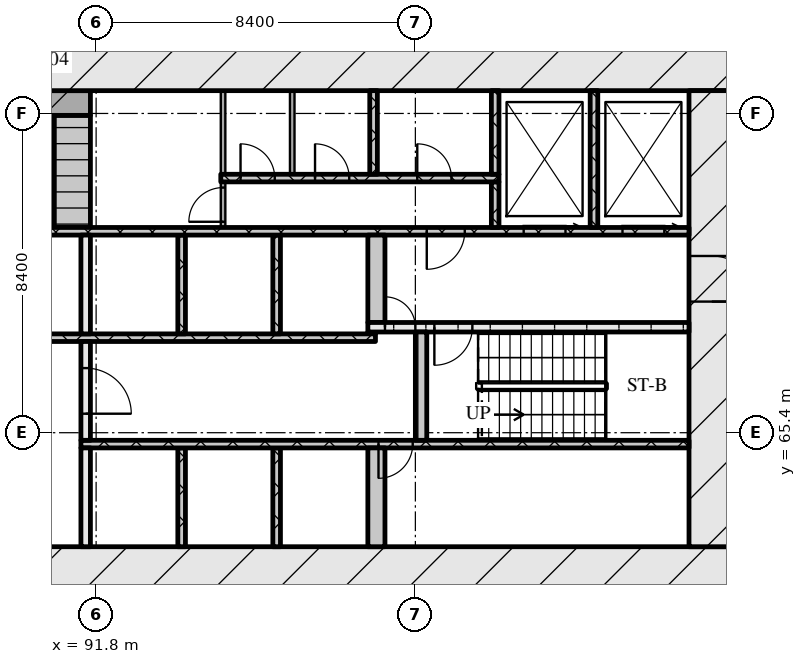
"""IFC4 building model, lengths in metres.
Left out: names, types, materials, properties, quantities, classifications, styles, units other than length and angle.
Written with IfcOpenShell. Run it as: python <this file> out.ifc"""

import sys

from ifc_helpers import new_model, si_unit, direction, frame, frame_2d, origin, place, context, subcontext, project, spatial, rectangle, extrude, element, fill, save


model = new_model("IFC4")
c1 = context("Model", 3, precision=1e-05, world=origin(), true_north=direction((0.0, 1.0)))
c2 = subcontext(c1, "Body", "Model", "MODEL_VIEW")
j1 = project(units=[si_unit("LENGTHUNIT", "METRE"), si_unit("PLANEANGLEUNIT", "RADIAN")], contexts=[c1])
p1 = place(None, origin())
s1 = spatial("IfcSite", under=j1, at=p1, CompositionType="ELEMENT")
p2 = place(p1, origin())
s2 = spatial("IfcBuilding", under=s1, at=p2, CompositionType="ELEMENT")
p3 = place(p2, frame((0.0, 0.0, 14.4)))
s3 = spatial("IfcBuildingStorey", under=s2, at=p3, CompositionType="ELEMENT", Elevation=14.4)
p4 = place(p3, frame((66.6, 61.8, 0.0), z_axis=(0.0, 0.0, 1.0), x_axis=(1.0, 0.0, 0.0)))
e1 = element("IfcWall", 1, at=p4, inside=s3, PredefinedType="SOLIDWALL", context=c2, shape_type="SweptSolid", body=[
    extrude(rectangle(XDim=42.0, YDim=1.2, at=frame_2d((21.0, 0.0))), origin(), (0.0, 0.0, 1.0), 4.5),
])
p5 = place(p4, frame((21.35, 0.0, 0.0)))
e2 = element("IfcOpeningElement", 2, at=p5, cuts=e1, PredefinedType="OPENING", context=c2, shape_type="SweptSolid", body=[
    extrude(rectangle(XDim=1.8, YDim=2.1, at=frame_2d((0.9, 1.05))), frame((0.0, 0.61, 0.0), z_axis=(0.0, -1.0, 0.0), x_axis=(1.0, 0.0, 0.0)), (0.0, 0.0, 1.0), 1.22),
])
p6 = place(p3, frame((66.6, 75.0, 0.0), z_axis=(0.0, 0.0, 1.0), x_axis=(1.0, 0.0, 0.0)))
e3 = element("IfcWall", 3, at=p6, inside=s3, PredefinedType="SOLIDWALL", context=c2, shape_type="SweptSolid", body=[
    extrude(rectangle(XDim=42.0, YDim=1.2, at=frame_2d((21.0, 0.0))), origin(), (0.0, 0.0, 1.0), 4.5),
])
p7 = place(p3, frame((108.0, 62.4, 0.0), z_axis=(0.0, 0.0, 1.0), x_axis=(0.0, 1.0, 0.0)))
e4 = element("IfcWall", 4, at=p7, inside=s3, PredefinedType="SOLIDWALL", context=c2, shape_type="SweptSolid", body=[
    extrude(rectangle(XDim=12.0, YDim=1.2, at=frame_2d((6.0, 0.0))), origin(), (0.0, 0.0, 1.0), 4.5),
])
p8 = place(p7, frame((6.45, 0.0, 0.0)))
e5 = element("IfcOpeningElement", 5, at=p8, cuts=e4, PredefinedType="OPENING", context=c2, shape_type="SweptSolid", body=[
    extrude(rectangle(XDim=1.2, YDim=2.1, at=frame_2d((0.6, 1.05))), frame((0.0, 0.61, 0.0), z_axis=(0.0, -1.0, 0.0), x_axis=(1.0, 0.0, 0.0)), (0.0, 0.0, 1.0), 1.22),
])
p9 = place(p3, frame((91.525, 62.4, 0.0), z_axis=(0.0, 0.0, 1.0), x_axis=(0.0, 1.0, 0.0)))
e6 = element("IfcWall", 6, at=p9, inside=s3, PredefinedType="SOLIDWALL", context=c2, shape_type="SweptSolid", body=[
    extrude(rectangle(XDim=2.6, YDim=0.25, at=frame_2d((1.3, 0.0))), origin(), (0.0, 0.0, 1.0), 4.5),
])
for number, where, z_axis, x_axis in (
    (7, (94.05, 62.4, 0.0), (0.0, 0.0, 1.0), (0.0, 1.0, 0.0)),
    (8, (96.55, 62.4, 0.0), (0.0, 0.0, 1.0), (0.0, 1.0, 0.0)),
):
    element("IfcWall", number, at=place(p3, frame(where, z_axis=z_axis, x_axis=x_axis)), inside=s3, PredefinedType="SOLIDWALL", context=c2, shape_type="SweptSolid", body=[
        extrude(rectangle(XDim=2.6, YDim=0.2, at=frame_2d((1.3, 0.0))), origin(), (0.0, 0.0, 1.0), 4.5),
    ])
p10 = place(p3, frame((99.175, 62.4, 0.0), z_axis=(0.0, 0.0, 1.0), x_axis=(0.0, 1.0, 0.0)))
e9 = element("IfcWall", 9, at=p10, inside=s3, PredefinedType="SOLIDWALL", context=c2, shape_type="SweptSolid", body=[
    extrude(rectangle(XDim=2.6, YDim=0.45, at=frame_2d((1.3, 0.0))), origin(), (0.0, 0.0, 1.0), 4.5),
])
p11 = place(p3, frame((91.4, 65.1, 0.0), z_axis=(0.0, 0.0, 1.0), x_axis=(1.0, 0.0, 0.0)))
e10 = element("IfcWall", 10, at=p11, inside=s3, PredefinedType="SOLIDWALL", context=c2, shape_type="SweptSolid", body=[
    extrude(rectangle(XDim=16.0, YDim=0.2, at=frame_2d((8.0, 0.0))), origin(), (0.0, 0.0, 1.0), 4.5),
])
p12 = place(p11, frame((7.83, 0.0, 0.0)))
e11 = element("IfcOpeningElement", 11, at=p12, cuts=e10, PredefinedType="OPENING", context=c2, shape_type="SweptSolid", body=[
    extrude(rectangle(XDim=0.9, YDim=2.1, at=frame_2d((0.45, 1.05))), frame((0.0, 0.11, 0.0), z_axis=(0.0, -1.0, 0.0), x_axis=(1.0, 0.0, 0.0)), (0.0, 0.0, 1.0), 0.22),
])
p13 = place(p3, frame((91.525, 65.2, 0.0), z_axis=(0.0, 0.0, 1.0), x_axis=(0.0, 1.0, 0.0)))
e12 = element("IfcWall", 12, at=p13, inside=s3, PredefinedType="SOLIDWALL", context=c2, shape_type="SweptSolid", body=[
    extrude(rectangle(XDim=2.6, YDim=0.25, at=frame_2d((1.3, 0.0))), origin(), (0.0, 0.0, 1.0), 4.5),
])
p14 = place(p13, frame((0.7, 0.0, 0.0)))
e13 = element("IfcOpeningElement", 13, at=p14, cuts=e12, PredefinedType="OPENING", context=c2, shape_type="SweptSolid", body=[
    extrude(rectangle(XDim=1.2, YDim=2.1, at=frame_2d((0.6, 1.05))), frame((0.0, 0.135, 0.0), z_axis=(0.0, -1.0, 0.0), x_axis=(1.0, 0.0, 0.0)), (0.0, 0.0, 1.0), 0.27),
])
p15 = place(p3, frame((100.35, 65.2, 0.0), z_axis=(0.0, 0.0, 1.0), x_axis=(0.0, 1.0, 0.0)))
e14 = element("IfcWall", 14, at=p15, inside=s3, PredefinedType="SOLIDWALL", context=c2, shape_type="SweptSolid", body=[
    extrude(rectangle(XDim=2.85, YDim=0.3, at=frame_2d((1.425, 0.0))), origin(), (0.0, 0.0, 1.0), 4.5),
])
p16 = place(p3, frame((76.05, 67.9, 0.0), z_axis=(0.0, 0.0, 1.0), x_axis=(1.0, 0.0, 0.0)))
e15 = element("IfcWall", 15, at=p16, inside=s3, PredefinedType="SOLIDWALL", context=c2, shape_type="SweptSolid", body=[
    extrude(rectangle(XDim=23.1, YDim=0.2, at=frame_2d((11.55, 0.0))), origin(), (0.0, 0.0, 1.0), 4.5),
])
p17 = place(p16, frame((8.35, 0.0, 0.0)))
e16 = element("IfcOpeningElement", 16, at=p17, cuts=e15, PredefinedType="OPENING", context=c2, shape_type="SweptSolid", body=[
    extrude(rectangle(XDim=1.1, YDim=2.1, at=frame_2d((0.55, 1.05))), frame((0.0, 0.11, 0.0), z_axis=(0.0, -1.0, 0.0), x_axis=(1.0, 0.0, 0.0)), (0.0, 0.0, 1.0), 0.22),
])
p18 = place(p16, frame((10.85, 0.0, 0.0)))
e17 = element("IfcOpeningElement", 17, at=p18, cuts=e15, PredefinedType="OPENING", context=c2, shape_type="SweptSolid", body=[
    extrude(rectangle(XDim=1.1, YDim=2.1, at=frame_2d((0.55, 1.05))), frame((0.0, 0.11, 0.0), z_axis=(0.0, -1.0, 0.0), x_axis=(1.0, 0.0, 0.0)), (0.0, 0.0, 1.0), 0.22),
])
p19 = place(p16, frame((13.55, 0.0, 0.0)))
e18 = element("IfcOpeningElement", 18, at=p19, cuts=e15, PredefinedType="OPENING", context=c2, shape_type="SweptSolid", body=[
    extrude(rectangle(XDim=1.0, YDim=2.1, at=frame_2d((0.5, 1.05))), frame((0.0, 0.11, 0.0), z_axis=(0.0, -1.0, 0.0), x_axis=(1.0, 0.0, 0.0)), (0.0, 0.0, 1.0), 0.22),
])
p20 = place(p3, frame((91.525, 68.0, 0.0), z_axis=(0.0, 0.0, 1.0), x_axis=(0.0, 1.0, 0.0)))
e19 = element("IfcWall", 19, at=p20, inside=s3, PredefinedType="SOLIDWALL", context=c2, shape_type="SweptSolid", body=[
    extrude(rectangle(XDim=2.6, YDim=0.25, at=frame_2d((1.3, 0.0))), origin(), (0.0, 0.0, 1.0), 4.5),
])
for number, where, z_axis, x_axis in (
    (20, (94.05, 68.0, 0.0), (0.0, 0.0, 1.0), (0.0, 1.0, 0.0)),
    (21, (96.55, 68.0, 0.0), (0.0, 0.0, 1.0), (0.0, 1.0, 0.0)),
):
    element("IfcWall", number, at=place(p3, frame(where, z_axis=z_axis, x_axis=x_axis)), inside=s3, PredefinedType="SOLIDWALL", context=c2, shape_type="SweptSolid", body=[
        extrude(rectangle(XDim=2.6, YDim=0.2, at=frame_2d((1.3, 0.0))), origin(), (0.0, 0.0, 1.0), 4.5),
    ])
p21 = place(p3, frame((98.95, 68.025, 0.0), z_axis=(0.0, 0.0, 1.0), x_axis=(1.0, 0.0, 0.0)))
e22 = element("IfcWall", 22, at=p21, inside=s3, PredefinedType="SOLIDWALL", context=c2, shape_type="SweptSolid", body=[
    extrude(rectangle(XDim=0.2, YDim=0.05, at=frame_2d((0.1, 0.0))), origin(), (0.0, 0.0, 1.0), 4.5),
])
p22 = place(p3, frame((98.95, 68.175, 0.0), z_axis=(0.0, 0.0, 1.0), x_axis=(1.0, 0.0, 0.0)))
e23 = element("IfcWall", 23, at=p22, inside=s3, PredefinedType="SOLIDWALL", context=c2, shape_type="SweptSolid", body=[
    extrude(rectangle(XDim=8.45, YDim=0.25, at=frame_2d((4.225, 0.0))), origin(), (0.0, 0.0, 1.0), 4.5),
])
p23 = place(p22, frame((0.45, 0.0, 0.0)))
e24 = element("IfcOpeningElement", 24, at=p23, cuts=e23, PredefinedType="OPENING", context=c2, shape_type="SweptSolid", body=[
    extrude(rectangle(XDim=0.8, YDim=2.1, at=frame_2d((0.4, 1.05))), frame((0.0, 0.135, 0.0), z_axis=(0.0, -1.0, 0.0), x_axis=(1.0, 0.0, 0.0)), (0.0, 0.0, 1.0), 0.27),
])
p24 = place(p22, frame((1.75, 0.0, 0.0)))
e25 = element("IfcOpeningElement", 25, at=p24, cuts=e23, PredefinedType="OPENING", context=c2, shape_type="SweptSolid", body=[
    extrude(rectangle(XDim=1.0, YDim=2.1, at=frame_2d((0.5, 1.05))), frame((0.0, 0.135, 0.0), z_axis=(0.0, -1.0, 0.0), x_axis=(1.0, 0.0, 0.0)), (0.0, 0.0, 1.0), 0.27),
])
p25 = place(p3, frame((99.175, 68.3, 0.0), z_axis=(0.0, 0.0, 1.0), x_axis=(0.0, 1.0, 0.0)))
e26 = element("IfcWall", 26, at=p25, inside=s3, PredefinedType="SOLIDWALL", context=c2, shape_type="SweptSolid", body=[
    extrude(rectangle(XDim=2.3, YDim=0.45, at=frame_2d((1.15, 0.0))), origin(), (0.0, 0.0, 1.0), 4.5),
])
p26 = place(p3, frame((67.8, 70.7, 0.0), z_axis=(0.0, 0.0, 1.0), x_axis=(1.0, 0.0, 0.0)))
e27 = element("IfcWall", 27, at=p26, inside=s3, PredefinedType="SOLIDWALL", context=c2, shape_type="SweptSolid", body=[
    extrude(rectangle(XDim=39.6, YDim=0.2, at=frame_2d((19.8, 0.0))), origin(), (0.0, 0.0, 1.0), 4.5),
])
p27 = place(p26, frame((0.65, 0.0, 0.0)))
e28 = element("IfcOpeningElement", 28, at=p27, cuts=e27, PredefinedType="OPENING", context=c2, shape_type="SweptSolid", body=[
    extrude(rectangle(XDim=1.1, YDim=2.1, at=frame_2d((0.55, 1.05))), frame((0.0, 0.11, 0.0), z_axis=(0.0, -1.0, 0.0), x_axis=(1.0, 0.0, 0.0)), (0.0, 0.0, 1.0), 0.22),
])
p28 = place(p26, frame((3.25, 0.0, 0.0)))
e29 = element("IfcOpeningElement", 29, at=p28, cuts=e27, PredefinedType="OPENING", context=c2, shape_type="SweptSolid", body=[
    extrude(rectangle(XDim=1.1, YDim=2.1, at=frame_2d((0.55, 1.05))), frame((0.0, 0.11, 0.0), z_axis=(0.0, -1.0, 0.0), x_axis=(1.0, 0.0, 0.0)), (0.0, 0.0, 1.0), 0.22),
])
p29 = place(p26, frame((5.9, 0.0, 0.0)))
e30 = element("IfcOpeningElement", 30, at=p29, cuts=e27, PredefinedType="OPENING", context=c2, shape_type="SweptSolid", body=[
    extrude(rectangle(XDim=1.0, YDim=2.1, at=frame_2d((0.5, 1.05))), frame((0.0, 0.11, 0.0), z_axis=(0.0, -1.0, 0.0), x_axis=(1.0, 0.0, 0.0)), (0.0, 0.0, 1.0), 0.22),
])
p30 = place(p26, frame((21.7, 0.0, 0.0)))
e31 = element("IfcOpeningElement", 31, at=p30, cuts=e27, PredefinedType="OPENING", context=c2, shape_type="SweptSolid", body=[
    extrude(rectangle(XDim=1.0, YDim=2.1, at=frame_2d((0.5, 1.05))), frame((0.0, 0.11, 0.0), z_axis=(0.0, -1.0, 0.0), x_axis=(1.0, 0.0, 0.0)), (0.0, 0.0, 1.0), 0.22),
])
p31 = place(p26, frame((32.7, 0.0, 0.0)))
e32 = element("IfcOpeningElement", 32, at=p31, cuts=e27, PredefinedType="OPENING", context=c2, shape_type="SweptSolid", body=[
    extrude(rectangle(XDim=1.0, YDim=2.1, at=frame_2d((0.5, 1.05))), frame((0.0, 0.11, 0.0), z_axis=(0.0, -1.0, 0.0), x_axis=(1.0, 0.0, 0.0)), (0.0, 0.0, 1.0), 0.22),
])
p32 = place(p26, frame((35.25, 0.0, 0.0)))
e33 = element("IfcOpeningElement", 33, at=p32, cuts=e27, PredefinedType="OPENING", context=c2, shape_type="SweptSolid", body=[
    extrude(rectangle(XDim=1.1, YDim=2.1, at=frame_2d((0.55, 1.05))), frame((0.0, 0.11, 0.0), z_axis=(0.0, -1.0, 0.0), x_axis=(1.0, 0.0, 0.0)), (0.0, 0.0, 1.0), 0.22),
])
p33 = place(p26, frame((37.85, 0.0, 0.0)))
e34 = element("IfcOpeningElement", 34, at=p33, cuts=e27, PredefinedType="OPENING", context=c2, shape_type="SweptSolid", body=[
    extrude(rectangle(XDim=1.1, YDim=2.1, at=frame_2d((0.55, 1.05))), frame((0.0, 0.11, 0.0), z_axis=(0.0, -1.0, 0.0), x_axis=(1.0, 0.0, 0.0)), (0.0, 0.0, 1.0), 0.22),
])
p34 = place(p3, frame((91.175, 70.8, 0.0), z_axis=(0.0, 0.0, 1.0), x_axis=(0.0, 1.0, 0.0)))
e35 = element("IfcWall", 35, at=p34, inside=s3, PredefinedType="SOLIDWALL", context=c2, shape_type="SweptSolid", body=[
    extrude(rectangle(XDim=2.95, YDim=0.95, at=frame_2d((1.475, 0.0))), origin(), (0.0, 0.0, 1.0), 4.5),
])
p35 = place(p3, frame((95.14, 70.8, 0.0), z_axis=(0.0, 0.0, 1.0), x_axis=(0.0, 1.0, 0.0)))
e36 = element("IfcWall", 36, at=p35, inside=s3, PredefinedType="PARTITIONING", context=c2, shape_type="SweptSolid", body=[
    extrude(rectangle(XDim=1.2, YDim=0.12, at=frame_2d((0.6, 0.0))), origin(), (0.0, 0.0, 1.0), 4.5),
])
p36 = place(p35, frame((0.15, 0.0, 0.0)))
e37 = element("IfcOpeningElement", 37, at=p36, cuts=e36, PredefinedType="OPENING", context=c2, shape_type="SweptSolid", body=[
    extrude(rectangle(XDim=0.9, YDim=2.1, at=frame_2d((0.45, 1.05))), frame((0.0, 0.07, 0.0), z_axis=(0.0, -1.0, 0.0), x_axis=(1.0, 0.0, 0.0)), (0.0, 0.0, 1.0), 0.14),
])
p37 = place(p3, frame((102.3, 70.8, 0.0), z_axis=(0.0, 0.0, 1.0), x_axis=(0.0, 1.0, 0.0)))
e38 = element("IfcWall", 38, at=p37, inside=s3, PredefinedType="SOLIDWALL", context=c2, shape_type="SweptSolid", body=[
    extrude(rectangle(XDim=1.2, YDim=0.2, at=frame_2d((0.6, 0.0))), origin(), (0.0, 0.0, 1.0), 4.5),
])
p38 = place(p3, frame((104.9, 70.8, 0.0), z_axis=(0.0, 0.0, 1.0), x_axis=(0.0, 1.0, 0.0)))
e39 = element("IfcWall", 39, at=p38, inside=s3, PredefinedType="SOLIDWALL", context=c2, shape_type="SweptSolid", body=[
    extrude(rectangle(XDim=3.6, YDim=0.2, at=frame_2d((1.8, 0.0))), origin(), (0.0, 0.0, 1.0), 4.5),
])
p39 = place(p3, frame((95.08, 72.1, 0.0), z_axis=(0.0, 0.0, 1.0), x_axis=(1.0, 0.0, 0.0)))
e40 = element("IfcWall", 40, at=p39, inside=s3, PredefinedType="SOLIDWALL", context=c2, shape_type="SweptSolid", body=[
    extrude(rectangle(XDim=7.32, YDim=0.2, at=frame_2d((3.66, 0.0))), origin(), (0.0, 0.0, 1.0), 4.5),
])
p40 = place(p39, frame((0.52, 0.0, 0.0)))
e41 = element("IfcOpeningElement", 41, at=p40, cuts=e40, PredefinedType="OPENING", context=c2, shape_type="SweptSolid", body=[
    extrude(rectangle(XDim=0.9, YDim=2.1, at=frame_2d((0.45, 1.05))), frame((0.0, 0.11, 0.0), z_axis=(0.0, -1.0, 0.0), x_axis=(1.0, 0.0, 0.0)), (0.0, 0.0, 1.0), 0.22),
])
p41 = place(p39, frame((2.48, 0.0, 0.0)))
e42 = element("IfcOpeningElement", 42, at=p41, cuts=e40, PredefinedType="OPENING", context=c2, shape_type="SweptSolid", body=[
    extrude(rectangle(XDim=0.9, YDim=2.1, at=frame_2d((0.45, 1.05))), frame((0.0, 0.11, 0.0), z_axis=(0.0, -1.0, 0.0), x_axis=(1.0, 0.0, 0.0)), (0.0, 0.0, 1.0), 0.22),
])
p42 = place(p39, frame((5.17, 0.0, 0.0)))
e43 = element("IfcOpeningElement", 43, at=p42, cuts=e40, PredefinedType="OPENING", context=c2, shape_type="SweptSolid", body=[
    extrude(rectangle(XDim=0.9, YDim=2.1, at=frame_2d((0.45, 1.05))), frame((0.0, 0.11, 0.0), z_axis=(0.0, -1.0, 0.0), x_axis=(1.0, 0.0, 0.0)), (0.0, 0.0, 1.0), 0.22),
])
for number, where, z_axis, x_axis in (
    (44, (95.14, 72.2, 0.0), (0.0, 0.0, 1.0), (0.0, 1.0, 0.0)),
    (45, (96.96, 72.2, 0.0), (0.0, 0.0, 1.0), (0.0, 1.0, 0.0)),
):
    element("IfcWall", number, at=place(p3, frame(where, z_axis=z_axis, x_axis=x_axis)), inside=s3, PredefinedType="PARTITIONING", context=c2, shape_type="SweptSolid", body=[
        extrude(rectangle(XDim=2.2, YDim=0.12, at=frame_2d((1.1, 0.0))), origin(), (0.0, 0.0, 1.0), 4.5),
    ])
for number, where, z_axis, x_axis in (
    (46, (99.1, 72.2, 0.0), (0.0, 0.0, 1.0), (0.0, 1.0, 0.0)),
    (47, (102.3, 72.2, 0.0), (0.0, 0.0, 1.0), (0.0, 1.0, 0.0)),
):
    element("IfcWall", number, at=place(p3, frame(where, z_axis=z_axis, x_axis=x_axis)), inside=s3, PredefinedType="SOLIDWALL", context=c2, shape_type="SweptSolid", body=[
        extrude(rectangle(XDim=2.2, YDim=0.2, at=frame_2d((1.1, 0.0))), origin(), (0.0, 0.0, 1.0), 4.5),
    ])
p43 = place(p3, frame((83.55, 74.075, 0.0), z_axis=(0.0, 0.0, 1.0), x_axis=(1.0, 0.0, 0.0)))
e48 = element("IfcWall", 48, at=p43, inside=s3, PredefinedType="SOLIDWALL", context=c2, shape_type="SweptSolid", body=[
    extrude(rectangle(XDim=8.1, YDim=0.65, at=frame_2d((4.05, 0.0))), origin(), (0.0, 0.0, 1.0), 4.5),
])
p44 = place(p12, origin())
e49 = element("IfcDoor", 49, at=p44, inside=s3, OperationType="SINGLE_SWING_RIGHT", PredefinedType="DOOR", context=c2, shape_type="SweptSolid", body=[
    extrude(rectangle(XDim=0.9, YDim=2.1, at=frame_2d((0.45, 1.05))), frame((0.0, 0.025, 0.0), z_axis=(0.0, -1.0, 0.0), x_axis=(1.0, 0.0, 0.0)), (0.0, 0.0, 1.0), 0.05),
])
fill(e11, e49)
p45 = place(p14, origin())
e50 = element("IfcDoor", 50, at=p45, inside=s3, OperationType="SINGLE_SWING_RIGHT", PredefinedType="DOOR", context=c2, shape_type="SweptSolid", body=[
    extrude(rectangle(XDim=1.2, YDim=2.1, at=frame_2d((0.6, 1.05))), frame((0.0, 0.025, 0.0), z_axis=(0.0, -1.0, 0.0), x_axis=(1.0, 0.0, 0.0)), (0.0, 0.0, 1.0), 0.05),
])
fill(e13, e50)
p46 = place(p23, origin())
e51 = element("IfcDoor", 51, at=p46, inside=s3, OperationType="SINGLE_SWING_LEFT", PredefinedType="DOOR", context=c2, shape_type="SweptSolid", body=[
    extrude(rectangle(XDim=0.8, YDim=2.1, at=frame_2d((0.4, 1.05))), frame((0.0, 0.025, 0.0), z_axis=(0.0, -1.0, 0.0), x_axis=(1.0, 0.0, 0.0)), (0.0, 0.0, 1.0), 0.05),
])
fill(e24, e51)
p47 = place(p24, origin())
e52 = element("IfcDoor", 52, at=p47, inside=s3, OperationType="SINGLE_SWING_RIGHT", PredefinedType="DOOR", context=c2, shape_type="SweptSolid", body=[
    extrude(rectangle(XDim=1.0, YDim=2.1, at=frame_2d((0.5, 1.05))), frame((0.0, 0.025, 0.0), z_axis=(0.0, -1.0, 0.0), x_axis=(1.0, 0.0, 0.0)), (0.0, 0.0, 1.0), 0.05),
])
fill(e25, e52)
p48 = place(p8, origin())
e53 = element("IfcDoor", 53, at=p48, inside=s3, OperationType="SINGLE_SWING_RIGHT", PredefinedType="DOOR", context=c2, shape_type="SweptSolid", body=[
    extrude(rectangle(XDim=1.2, YDim=2.1, at=frame_2d((0.6, 1.05))), frame((0.0, 0.025, 0.0), z_axis=(0.0, -1.0, 0.0), x_axis=(1.0, 0.0, 0.0)), (0.0, 0.0, 1.0), 0.05),
])
fill(e5, e53)
p49 = place(p31, origin())
e54 = element("IfcDoor", 54, at=p49, inside=s3, OperationType="SINGLE_SWING_RIGHT", PredefinedType="DOOR", context=c2, shape_type="SweptSolid", body=[
    extrude(rectangle(XDim=1.0, YDim=2.1, at=frame_2d((0.5, 1.05))), frame((0.0, 0.025, 0.0), z_axis=(0.0, -1.0, 0.0), x_axis=(1.0, 0.0, 0.0)), (0.0, 0.0, 1.0), 0.05),
])
fill(e32, e54)
p50 = place(p32, origin())
e55 = element("IfcDoor", 55, at=p50, inside=s3, OperationType="SLIDING_TO_RIGHT", PredefinedType="DOOR", context=c2, shape_type="SweptSolid", body=[
    extrude(rectangle(XDim=1.1, YDim=2.1, at=frame_2d((0.55, 1.05))), frame((0.0, 0.025, 0.0), z_axis=(0.0, -1.0, 0.0), x_axis=(1.0, 0.0, 0.0)), (0.0, 0.0, 1.0), 0.05),
])
fill(e33, e55)
p51 = place(p33, origin())
e56 = element("IfcDoor", 56, at=p51, inside=s3, OperationType="SLIDING_TO_RIGHT", PredefinedType="DOOR", context=c2, shape_type="SweptSolid", body=[
    extrude(rectangle(XDim=1.1, YDim=2.1, at=frame_2d((0.55, 1.05))), frame((0.0, 0.025, 0.0), z_axis=(0.0, -1.0, 0.0), x_axis=(1.0, 0.0, 0.0)), (0.0, 0.0, 1.0), 0.05),
])
fill(e34, e56)
p52 = place(p36, origin())
e57 = element("IfcDoor", 57, at=p52, inside=s3, OperationType="SINGLE_SWING_LEFT", PredefinedType="DOOR", context=c2, shape_type="SweptSolid", body=[
    extrude(rectangle(XDim=0.9, YDim=2.1, at=frame_2d((0.45, 1.05))), frame((0.0, 0.025, 0.0), z_axis=(0.0, -1.0, 0.0), x_axis=(1.0, 0.0, 0.0)), (0.0, 0.0, 1.0), 0.05),
])
fill(e37, e57)
p53 = place(p40, origin())
e58 = element("IfcDoor", 58, at=p53, inside=s3, OperationType="SINGLE_SWING_LEFT", PredefinedType="DOOR", context=c2, shape_type="SweptSolid", body=[
    extrude(rectangle(XDim=0.9, YDim=2.1, at=frame_2d((0.45, 1.05))), frame((0.0, 0.025, 0.0), z_axis=(0.0, -1.0, 0.0), x_axis=(1.0, 0.0, 0.0)), (0.0, 0.0, 1.0), 0.05),
])
fill(e41, e58)
p54 = place(p41, origin())
e59 = element("IfcDoor", 59, at=p54, inside=s3, OperationType="SINGLE_SWING_LEFT", PredefinedType="DOOR", context=c2, shape_type="SweptSolid", body=[
    extrude(rectangle(XDim=0.9, YDim=2.1, at=frame_2d((0.45, 1.05))), frame((0.0, 0.025, 0.0), z_axis=(0.0, -1.0, 0.0), x_axis=(1.0, 0.0, 0.0)), (0.0, 0.0, 1.0), 0.05),
])
fill(e42, e59)
p55 = place(p42, origin())
e60 = element("IfcDoor", 60, at=p55, inside=s3, OperationType="SINGLE_SWING_LEFT", PredefinedType="DOOR", context=c2, shape_type="SweptSolid", body=[
    extrude(rectangle(XDim=0.9, YDim=2.1, at=frame_2d((0.45, 1.05))), frame((0.0, 0.025, 0.0), z_axis=(0.0, -1.0, 0.0), x_axis=(1.0, 0.0, 0.0)), (0.0, 0.0, 1.0), 0.05),
])
fill(e43, e60)
save(model, sys.argv[1])
